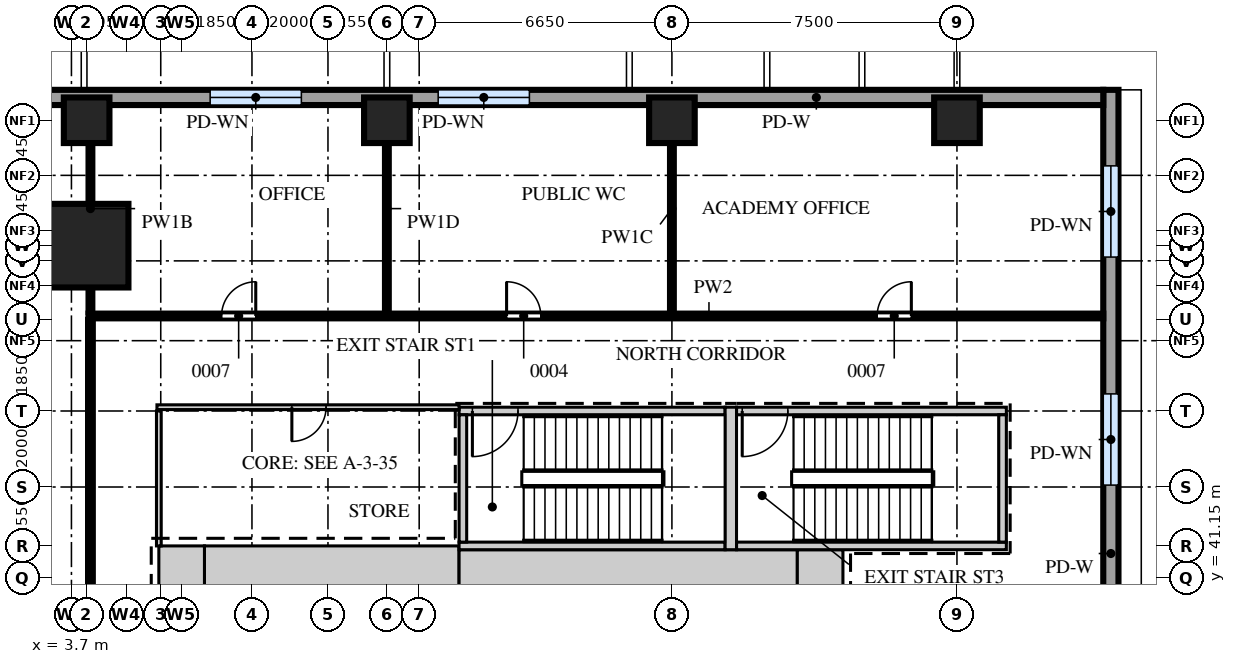
"""IFC4 building model, lengths in metres.
Left out: names, types, materials, properties, quantities, classifications, styles, units other than length and angle.
Written with IfcOpenShell. Run it as: python <this file> out.ifc"""

import sys

from ifc_helpers import new_model, si_unit, direction, frame, frame_2d, origin, origin_2d, place, context, subcontext, project, spatial, rectangle, extrude, source, transform, mapped, element, fill, save


model = new_model("IFC4")
c1 = context("Model", 3, precision=1e-05, world=origin(), true_north=direction((0.0, 1.0)))
c2 = subcontext(c1, "Body", "Model", "MODEL_VIEW")
j1 = project(units=[si_unit("LENGTHUNIT", "METRE"), si_unit("PLANEANGLEUNIT", "RADIAN")], contexts=[c1])
p1 = place(None, origin())
s1 = spatial("IfcSite", under=j1, at=p1, CompositionType="ELEMENT")
p2 = place(p1, origin())
s2 = spatial("IfcBuilding", under=s1, at=p2, CompositionType="ELEMENT")
p3 = place(p2, frame((0.0, 0.0, 23.5)))
s3 = spatial("IfcBuildingStorey", under=s2, at=p3, CompositionType="ELEMENT", Elevation=23.5)
m1 = source(origin(), c2, "Body", "SweptSolid", [
    extrude(rectangle(XDim=6.7, YDim=1.2, at=frame_2d((3.35, 0.0))), origin(), (0.0, 0.0, 1.0), 4.7),
])
p4 = place(p3, frame((7.2, 41.4, 0.0), z_axis=(0.0, 0.0, 1.0), x_axis=(1.0, 0.0, 0.0)))
e1 = element("IfcWall", 1, at=p4, inside=s3, PredefinedType="SHEAR", context=c2, shape_type="MappedRepresentation", body=[
    mapped(m1, transform((0.0, 0.0, 0.0))),
])
m2 = source(origin(), c2, "Body", "SweptSolid", [
    extrude(rectangle(XDim=8.9, YDim=1.1, at=frame_2d((4.45, 0.0))), origin(), (0.0, 0.0, 1.0), 4.7),
])
p5 = place(p3, frame((13.9, 41.35, 0.0), z_axis=(0.0, 0.0, 1.0), x_axis=(1.0, 0.0, 0.0)))
e2 = element("IfcWall", 2, at=p5, inside=s3, PredefinedType="SHEAR", context=c2, shape_type="MappedRepresentation", body=[
    mapped(m2, transform((0.0, 0.0, 0.0))),
])
m3 = source(origin(), c2, "Body", "SweptSolid", [
    extrude(rectangle(XDim=1.2, YDim=1.1, at=frame_2d((0.6, 0.0))), origin(), (0.0, 0.0, 1.0), 4.7),
])
p6 = place(p3, frame((22.8, 41.35, 0.0), z_axis=(0.0, 0.0, 1.0), x_axis=(1.0, 0.0, 0.0)))
e3 = element("IfcWall", 3, at=p6, inside=s3, PredefinedType="SHEAR", context=c2, shape_type="MappedRepresentation", body=[
    mapped(m3, transform((0.0, 0.0, 0.0))),
])
m4 = source(origin(), c2, "Body", "SweptSolid", [
    extrude(rectangle(XDim=1.2, YDim=1.2, at=frame_2d((0.6, 0.0))), origin(), (0.0, 0.0, 1.0), 4.7),
])
p7 = place(p3, frame((6.0, 41.4, 0.0), z_axis=(0.0, 0.0, 1.0), x_axis=(1.0, 0.0, 0.0)))
e4 = element("IfcWall", 4, at=p7, inside=s3, PredefinedType="SHEAR", context=c2, shape_type="MappedRepresentation", body=[
    mapped(m4, transform((0.0, 0.0, 0.0))),
])
m5 = source(origin(), c2, "Body", "SweptSolid", [
    extrude(rectangle(XDim=7.0, YDim=0.2, at=frame_2d((3.5, 0.0))), origin(), (0.0, 0.0, 1.0), 4.7),
])
p8 = place(p3, frame((13.9, 45.55, 0.0), z_axis=(0.0, 0.0, 1.0), x_axis=(1.0, 0.0, 0.0)))
e5 = element("IfcWall", 5, at=p8, inside=s3, PredefinedType="SHEAR", context=c2, shape_type="MappedRepresentation", body=[
    mapped(m5, transform((0.0, 0.0, 0.0))),
])
m6 = source(origin(), c2, "Body", "SweptSolid", [
    extrude(rectangle(XDim=1.2, YDim=2.1, at=frame_2d((0.6, 1.05))), frame((0.0, 0.11, 0.0), z_axis=(0.0, -1.0, 0.0), x_axis=(1.0, 0.0, 0.0)), (0.0, 0.0, 1.0), 0.22),
])
p9 = place(p8, frame((0.35, 0.0, 0.0)))
e6 = element("IfcOpeningElement", 6, at=p9, cuts=e5, PredefinedType="OPENING", context=c2, shape_type="MappedRepresentation", body=[
    mapped(m6, transform((0.0, 0.0, 0.0))),
])
p10 = place(p3, frame((13.9, 42.0, 0.0), z_axis=(0.0, 0.0, 1.0), x_axis=(1.0, 0.0, 0.0)))
e7 = element("IfcWall", 7, at=p10, inside=s3, PredefinedType="SHEAR", context=c2, shape_type="MappedRepresentation", body=[
    mapped(m5, transform((0.0, 0.0, 0.0))),
])
m7 = source(origin(), c2, "Body", "SweptSolid", [
    extrude(rectangle(XDim=7.1, YDim=0.2, at=frame_2d((3.55, 0.0))), origin(), (0.0, 0.0, 1.0), 4.7),
])
p11 = place(p3, frame((21.2, 45.55, 0.0), z_axis=(0.0, 0.0, 1.0), x_axis=(1.0, 0.0, 0.0)))
e8 = element("IfcWall", 8, at=p11, inside=s3, PredefinedType="SHEAR", context=c2, shape_type="MappedRepresentation", body=[
    mapped(m7, transform((0.0, 0.0, 0.0))),
])
p12 = place(p11, frame((0.15, 0.0, 0.0)))
e9 = element("IfcOpeningElement", 9, at=p12, cuts=e8, PredefinedType="OPENING", context=c2, shape_type="MappedRepresentation", body=[
    mapped(m6, transform((0.0, 0.0, 0.0))),
])
p13 = place(p3, frame((21.2, 42.0, 0.0), z_axis=(0.0, 0.0, 1.0), x_axis=(1.0, 0.0, 0.0)))
e10 = element("IfcWall", 10, at=p13, inside=s3, PredefinedType="SHEAR", context=c2, shape_type="MappedRepresentation", body=[
    mapped(m7, transform((0.0, 0.0, 0.0))),
])
m8 = source(origin(), c2, "Body", "SweptSolid", [
    extrude(rectangle(XDim=3.75, YDim=0.3, at=frame_2d((1.875, 0.0))), origin(), (0.0, 0.0, 1.0), 4.7),
])
p14 = place(p3, frame((21.05, 41.9, 0.0), z_axis=(0.0, 0.0, 1.0), x_axis=(0.0, 1.0, 0.0)))
e11 = element("IfcWall", 11, at=p14, inside=s3, PredefinedType="SHEAR", context=c2, shape_type="MappedRepresentation", body=[
    mapped(m8, transform((0.0, 0.0, 0.0))),
])
m9 = source(origin(), c2, "Body", "SweptSolid", [
    extrude(rectangle(XDim=3.35, YDim=0.2, at=frame_2d((1.675, 0.0))), origin(), (0.0, 0.0, 1.0), 4.7),
])
for number, where, z_axis, x_axis in (
    (12, (14.0, 42.1, 0.0), (0.0, 0.0, 1.0), (0.0, 1.0, 0.0)),
    (13, (28.2, 42.1, 0.0), (0.0, 0.0, 1.0), (0.0, 1.0, 0.0)),
):
    element("IfcWall", number, at=place(p3, frame(where, z_axis=z_axis, x_axis=x_axis)), inside=s3, PredefinedType="SHEAR", context=c2, shape_type="MappedRepresentation", body=[
        mapped(m9, transform((0.0, 0.0, 0.0))),
    ])
m10 = source(origin(), c2, "Body", "SweptSolid", [
    extrude(rectangle(XDim=2.2, YDim=2.2, at=origin_2d()), origin(), (0.0, 0.0, 1.0), 4.7),
])
p15 = place(p3, frame((4.1, 49.9, 0.0), z_axis=(0.0, 0.0, 1.0), x_axis=(1.0, 0.0, 0.0)))
e14 = element("IfcColumn", 14, at=p15, inside=s3, PredefinedType="COLUMN", context=c2, shape_type="MappedRepresentation", body=[
    mapped(m10, transform((0.0, 0.0, 0.0))),
])
m11 = source(origin(), c2, "Body", "SweptSolid", [
    extrude(rectangle(XDim=1.2, YDim=1.2, at=origin_2d()), origin(), (0.0, 0.0, 1.0), 4.7),
])
for number, where, z_axis, x_axis in (
    (15, (4.1, 53.2, 0.0), (0.0, 0.0, 1.0), (1.0, 0.0, 0.0)),
    (16, (12.0, 53.2, 0.0), (0.0, 0.0, 1.0), (1.0, 0.0, 0.0)),
    (17, (19.5, 53.2, 0.0), (0.0, 0.0, 1.0), (1.0, 0.0, 0.0)),
    (18, (27.0, 53.2, 0.0), (0.0, 0.0, 1.0), (1.0, 0.0, 0.0)),
):
    element("IfcColumn", number, at=place(p3, frame(where, z_axis=z_axis, x_axis=x_axis)), inside=s3, PredefinedType="COLUMN", context=c2, shape_type="MappedRepresentation", body=[
        mapped(m11, transform((0.0, 0.0, 0.0))),
    ])
m12 = source(origin(), c2, "Body", "SweptSolid", [
    extrude(rectangle(XDim=18.4, YDim=0.4, at=frame_2d((9.2, 0.0))), origin(), (0.0, 0.0, 1.0), 4.7),
])
p16 = place(p3, frame((31.05, 35.6, 0.0), z_axis=(0.0, 0.0, 1.0), x_axis=(0.0, 1.0, 0.0)))
e19 = element("IfcWall", 19, at=p16, inside=s3, PredefinedType="SOLIDWALL", context=c2, shape_type="MappedRepresentation", body=[
    mapped(m12, transform((0.0, 0.0, 0.0))),
])
m13 = source(origin(), c2, "Body", "SweptSolid", [
    extrude(rectangle(XDim=2.4, YDim=2.4, at=frame_2d((1.2, 1.2))), frame((0.0, 0.21, 0.0), z_axis=(0.0, -1.0, 0.0), x_axis=(1.0, 0.0, 0.0)), (0.0, 0.0, 1.0), 0.42),
])
p17 = place(p16, frame((2.0, 0.0, 1.0)))
e20 = element("IfcOpeningElement", 20, at=p17, cuts=e19, PredefinedType="OPENING", context=c2, shape_type="MappedRepresentation", body=[
    mapped(m13, transform((0.0, 0.0, 0.0))),
])
p18 = place(p16, frame((8.0, 0.0, 1.0)))
e21 = element("IfcOpeningElement", 21, at=p18, cuts=e19, PredefinedType="OPENING", context=c2, shape_type="MappedRepresentation", body=[
    mapped(m13, transform((0.0, 0.0, 0.0))),
])
p19 = place(p16, frame((14.0, 0.0, 1.0)))
e22 = element("IfcOpeningElement", 22, at=p19, cuts=e19, PredefinedType="OPENING", context=c2, shape_type="MappedRepresentation", body=[
    mapped(m13, transform((0.0, 0.0, 0.0))),
])
m14 = source(origin(), c2, "Body", "SweptSolid", [
    extrude(rectangle(XDim=32.64, YDim=0.4, at=frame_2d((16.32, 0.0))), origin(), (0.0, 0.0, 1.0), 4.7),
])
p20 = place(p3, frame((30.85, 53.8, 0.0), z_axis=(0.0, 0.0, 1.0), x_axis=(-1.0, 0.0, 0.0)))
e23 = element("IfcWall", 23, at=p20, inside=s3, PredefinedType="SOLIDWALL", context=c2, shape_type="MappedRepresentation", body=[
    mapped(m14, transform((0.0, 0.0, 0.0))),
])
p21 = place(p20, frame((15.1, 0.0, 1.0)))
e24 = element("IfcOpeningElement", 24, at=p21, cuts=e23, PredefinedType="OPENING", context=c2, shape_type="MappedRepresentation", body=[
    mapped(m13, transform((0.0, 0.0, 0.0))),
])
p22 = place(p20, frame((21.1, 0.0, 1.0)))
e25 = element("IfcOpeningElement", 25, at=p22, cuts=e23, PredefinedType="OPENING", context=c2, shape_type="MappedRepresentation", body=[
    mapped(m13, transform((0.0, 0.0, 0.0))),
])
m15 = source(origin(), c2, "Body", "SweptSolid", [
    extrude(rectangle(XDim=41.8, YDim=0.125, at=frame_2d((20.9, 0.0))), origin(), (0.0, 0.0, 1.0), 4.7),
])
p23 = place(p3, frame((4.2, 6.15, 0.0), z_axis=(0.0, 0.0, 1.0), x_axis=(0.0, 1.0, 0.0)))
e26 = element("IfcWall", 26, at=p23, inside=s3, PredefinedType="PARTITIONING", context=c2, shape_type="MappedRepresentation", body=[
    mapped(m15, transform((0.0, 0.0, 0.0))),
])
m16 = source(origin(), c2, "Body", "SweptSolid", [
    extrude(rectangle(XDim=1.2, YDim=2.1, at=frame_2d((0.6, 1.05))), frame((0.0, 0.073, 0.0), z_axis=(0.0, -1.0, 0.0), x_axis=(1.0, 0.0, 0.0)), (0.0, 0.0, 1.0), 0.145),
])
p24 = place(p23, frame((7.1, 0.0, 0.0)))
e27 = element("IfcOpeningElement", 27, at=p24, cuts=e26, PredefinedType="OPENING", context=c2, shape_type="MappedRepresentation", body=[
    mapped(m16, transform((0.0, 0.0, 0.0))),
])
p25 = place(p23, frame((25.85, 0.0, 0.0)))
e28 = element("IfcOpeningElement", 28, at=p25, cuts=e26, PredefinedType="OPENING", context=c2, shape_type="MappedRepresentation", body=[
    mapped(m16, transform((0.0, 0.0, 0.0))),
])
m17 = source(origin(), c2, "Body", "SweptSolid", [
    extrude(rectangle(XDim=3.55, YDim=0.125, at=frame_2d((1.775, 0.0))), origin(), (0.0, 0.0, 1.0), 4.7),
])
p26 = place(p3, frame((6.0, 42.0, 0.0), z_axis=(0.0, 0.0, 1.0), x_axis=(0.0, 1.0, 0.0)))
e29 = element("IfcWall", 29, at=p26, inside=s3, PredefinedType="PARTITIONING", context=c2, shape_type="MappedRepresentation", body=[
    mapped(m17, transform((0.0, 0.0, 0.0))),
])
m18 = source(origin(), c2, "Body", "SweptSolid", [
    extrude(rectangle(XDim=7.95, YDim=0.125, at=frame_2d((3.975, 0.0))), origin(), (0.0, 0.0, 1.0), 4.7),
])
p27 = place(p3, frame((5.95, 45.65, 0.0), z_axis=(0.0, 0.0, 1.0), x_axis=(1.0, 0.0, 0.0)))
e30 = element("IfcWall", 30, at=p27, inside=s3, PredefinedType="PARTITIONING", context=c2, shape_type="MappedRepresentation", body=[
    mapped(m18, transform((0.0, 0.0, 0.0))),
])
m19 = source(origin(), c2, "Body", "SweptSolid", [
    extrude(rectangle(XDim=0.9, YDim=2.1, at=frame_2d((0.45, 1.05))), frame((0.0, 0.073, 0.0), z_axis=(0.0, -1.0, 0.0), x_axis=(1.0, 0.0, 0.0)), (0.0, 0.0, 1.0), 0.145),
])
p28 = place(p27, frame((3.55, 0.0, 0.0)))
e31 = element("IfcOpeningElement", 31, at=p28, cuts=e30, PredefinedType="OPENING", context=c2, shape_type="MappedRepresentation", body=[
    mapped(m19, transform((0.0, 0.0, 0.0))),
])
m20 = source(origin(), c2, "Body", "SweptSolid", [
    extrude(rectangle(XDim=26.7, YDim=0.125, at=frame_2d((13.35, 0.0))), origin(), (0.0, 0.0, 1.0), 4.7),
])
p29 = place(p3, frame((4.15, 48.05, 0.0), z_axis=(0.0, 0.0, 1.0), x_axis=(1.0, 0.0, 0.0)))
e32 = element("IfcWall", 32, at=p29, inside=s3, PredefinedType="PARTITIONING", context=c2, shape_type="MappedRepresentation", body=[
    mapped(m20, transform((0.0, 0.0, 0.0))),
])
p30 = place(p29, frame((3.5, 0.0, 0.0)))
e33 = element("IfcOpeningElement", 33, at=p30, cuts=e32, PredefinedType="OPENING", context=c2, shape_type="MappedRepresentation", body=[
    mapped(m19, transform((0.0, 0.0, 0.0))),
])
p31 = place(p29, frame((11.0, 0.0, 0.0)))
e34 = element("IfcOpeningElement", 34, at=p31, cuts=e32, PredefinedType="OPENING", context=c2, shape_type="MappedRepresentation", body=[
    mapped(m19, transform((0.0, 0.0, 0.0))),
])
p32 = place(p29, frame((20.75, 0.0, 0.0)))
e35 = element("IfcOpeningElement", 35, at=p32, cuts=e32, PredefinedType="OPENING", context=c2, shape_type="MappedRepresentation", body=[
    mapped(m19, transform((0.0, 0.0, 0.0))),
])
m21 = source(origin(), c2, "Body", "SweptSolid", [
    extrude(rectangle(XDim=5.45, YDim=0.1, at=frame_2d((2.725, 0.0))), origin(), (0.0, 0.0, 1.0), 4.7),
])
p33 = place(p3, frame((4.2, 48.15, 0.0), z_axis=(0.0, 0.0, 1.0), x_axis=(0.0, 1.0, 0.0)))
e36 = element("IfcWall", 36, at=p33, inside=s3, PredefinedType="PARTITIONING", context=c2, shape_type="MappedRepresentation", body=[
    mapped(m21, transform((0.0, 0.0, 0.0))),
])
m22 = source(origin(), c2, "Body", "SweptSolid", [
    extrude(rectangle(XDim=5.45, YDim=0.1, at=frame_2d((2.725, 0.0))), origin(), (0.0, 0.0, 1.0), 4.2),
])
p34 = place(p3, frame((12.0, 48.15, 0.0), z_axis=(0.0, 0.0, 1.0), x_axis=(0.0, 1.0, 0.0)))
e37 = element("IfcWall", 37, at=p34, inside=s3, PredefinedType="PARTITIONING", context=c2, shape_type="MappedRepresentation", body=[
    mapped(m22, transform((0.0, 0.0, 0.0))),
])
m23 = source(origin(), c2, "Body", "SweptSolid", [
    extrude(rectangle(XDim=5.45, YDim=0.1, at=frame_2d((2.725, 0.0))), origin(), (0.0, 0.0, 1.0), 4.34),
])
p35 = place(p3, frame((19.5, 48.15, 0.0), z_axis=(0.0, 0.0, 1.0), x_axis=(0.0, 1.0, 0.0)))
e38 = element("IfcWall", 38, at=p35, inside=s3, PredefinedType="PARTITIONING", context=c2, shape_type="MappedRepresentation", body=[
    mapped(m23, transform((0.0, 0.0, 0.0))),
])
m24 = source(origin(), c2, "Body", "SweptSolid", [
    extrude(rectangle(XDim=2.4, YDim=2.4, at=frame_2d((1.2, 1.2))), frame((0.0, 0.03, 0.0), z_axis=(0.0, -1.0, 0.0), x_axis=(1.0, 0.0, 0.0)), (0.0, 0.0, 1.0), 0.06),
])
p36 = place(p18, origin())
e39 = element("IfcWindow", 39, at=p36, inside=s3, PartitioningType="SINGLE_PANEL", PredefinedType="WINDOW", context=c2, shape_type="MappedRepresentation", body=[
    mapped(m24, transform((0.0, 0.0, 0.0))),
])
fill(e21, e39)
p37 = place(p19, origin())
e40 = element("IfcWindow", 40, at=p37, inside=s3, PartitioningType="SINGLE_PANEL", PredefinedType="WINDOW", context=c2, shape_type="MappedRepresentation", body=[
    mapped(m24, transform((0.0, 0.0, 0.0))),
])
fill(e22, e40)
p38 = place(p21, origin())
e41 = element("IfcWindow", 41, at=p38, inside=s3, PartitioningType="SINGLE_PANEL", PredefinedType="WINDOW", context=c2, shape_type="MappedRepresentation", body=[
    mapped(m24, transform((0.0, 0.0, 0.0))),
])
fill(e24, e41)
p39 = place(p22, origin())
e42 = element("IfcWindow", 42, at=p39, inside=s3, PartitioningType="SINGLE_PANEL", PredefinedType="WINDOW", context=c2, shape_type="MappedRepresentation", body=[
    mapped(m24, transform((0.0, 0.0, 0.0))),
])
fill(e25, e42)
m25 = source(origin(), c2, "Body", "SweptSolid", [
    extrude(rectangle(XDim=0.9, YDim=2.1, at=frame_2d((0.45, 1.05))), frame((0.0, 0.025, 0.0), z_axis=(0.0, -1.0, 0.0), x_axis=(1.0, 0.0, 0.0)), (0.0, 0.0, 1.0), 0.05),
])
p40 = place(p30, origin())
e43 = element("IfcDoor", 43, at=p40, inside=s3, OperationType="SINGLE_SWING_LEFT", PredefinedType="DOOR", context=c2, shape_type="MappedRepresentation", body=[
    mapped(m25, transform((0.0, 0.0, 0.0))),
])
fill(e33, e43)
p41 = place(p31, origin())
e44 = element("IfcDoor", 44, at=p41, inside=s3, OperationType="SINGLE_SWING_RIGHT", PredefinedType="DOOR", context=c2, shape_type="MappedRepresentation", body=[
    mapped(m25, transform((0.0, 0.0, 0.0))),
])
fill(e34, e44)
p42 = place(p32, origin())
e45 = element("IfcDoor", 45, at=p42, inside=s3, OperationType="SINGLE_SWING_LEFT", PredefinedType="DOOR", context=c2, shape_type="MappedRepresentation", body=[
    mapped(m25, transform((0.0, 0.0, 0.0))),
])
fill(e35, e45)
p43 = place(p28, origin())
e46 = element("IfcDoor", 46, at=p43, inside=s3, OperationType="SINGLE_SWING_LEFT", PredefinedType="DOOR", context=c2, shape_type="MappedRepresentation", body=[
    mapped(m25, transform((0.0, 0.0, 0.0))),
])
fill(e31, e46)
m26 = source(origin(), c2, "Body", "SweptSolid", [
    extrude(rectangle(XDim=1.2, YDim=2.1, at=frame_2d((0.6, 1.05))), frame((0.0, 0.025, 0.0), z_axis=(0.0, -1.0, 0.0), x_axis=(1.0, 0.0, 0.0)), (0.0, 0.0, 1.0), 0.05),
])
p44 = place(p9, origin())
e47 = element("IfcDoor", 47, at=p44, inside=s3, OperationType="SINGLE_SWING_LEFT", PredefinedType="DOOR", context=c2, shape_type="MappedRepresentation", body=[
    mapped(m26, transform((0.0, 0.0, 0.0))),
])
fill(e6, e47)
p45 = place(p12, origin())
e48 = element("IfcDoor", 48, at=p45, inside=s3, OperationType="SINGLE_SWING_LEFT", PredefinedType="DOOR", context=c2, shape_type="MappedRepresentation", body=[
    mapped(m26, transform((0.0, 0.0, 0.0))),
])
fill(e9, e48)
save(model, sys.argv[1])
